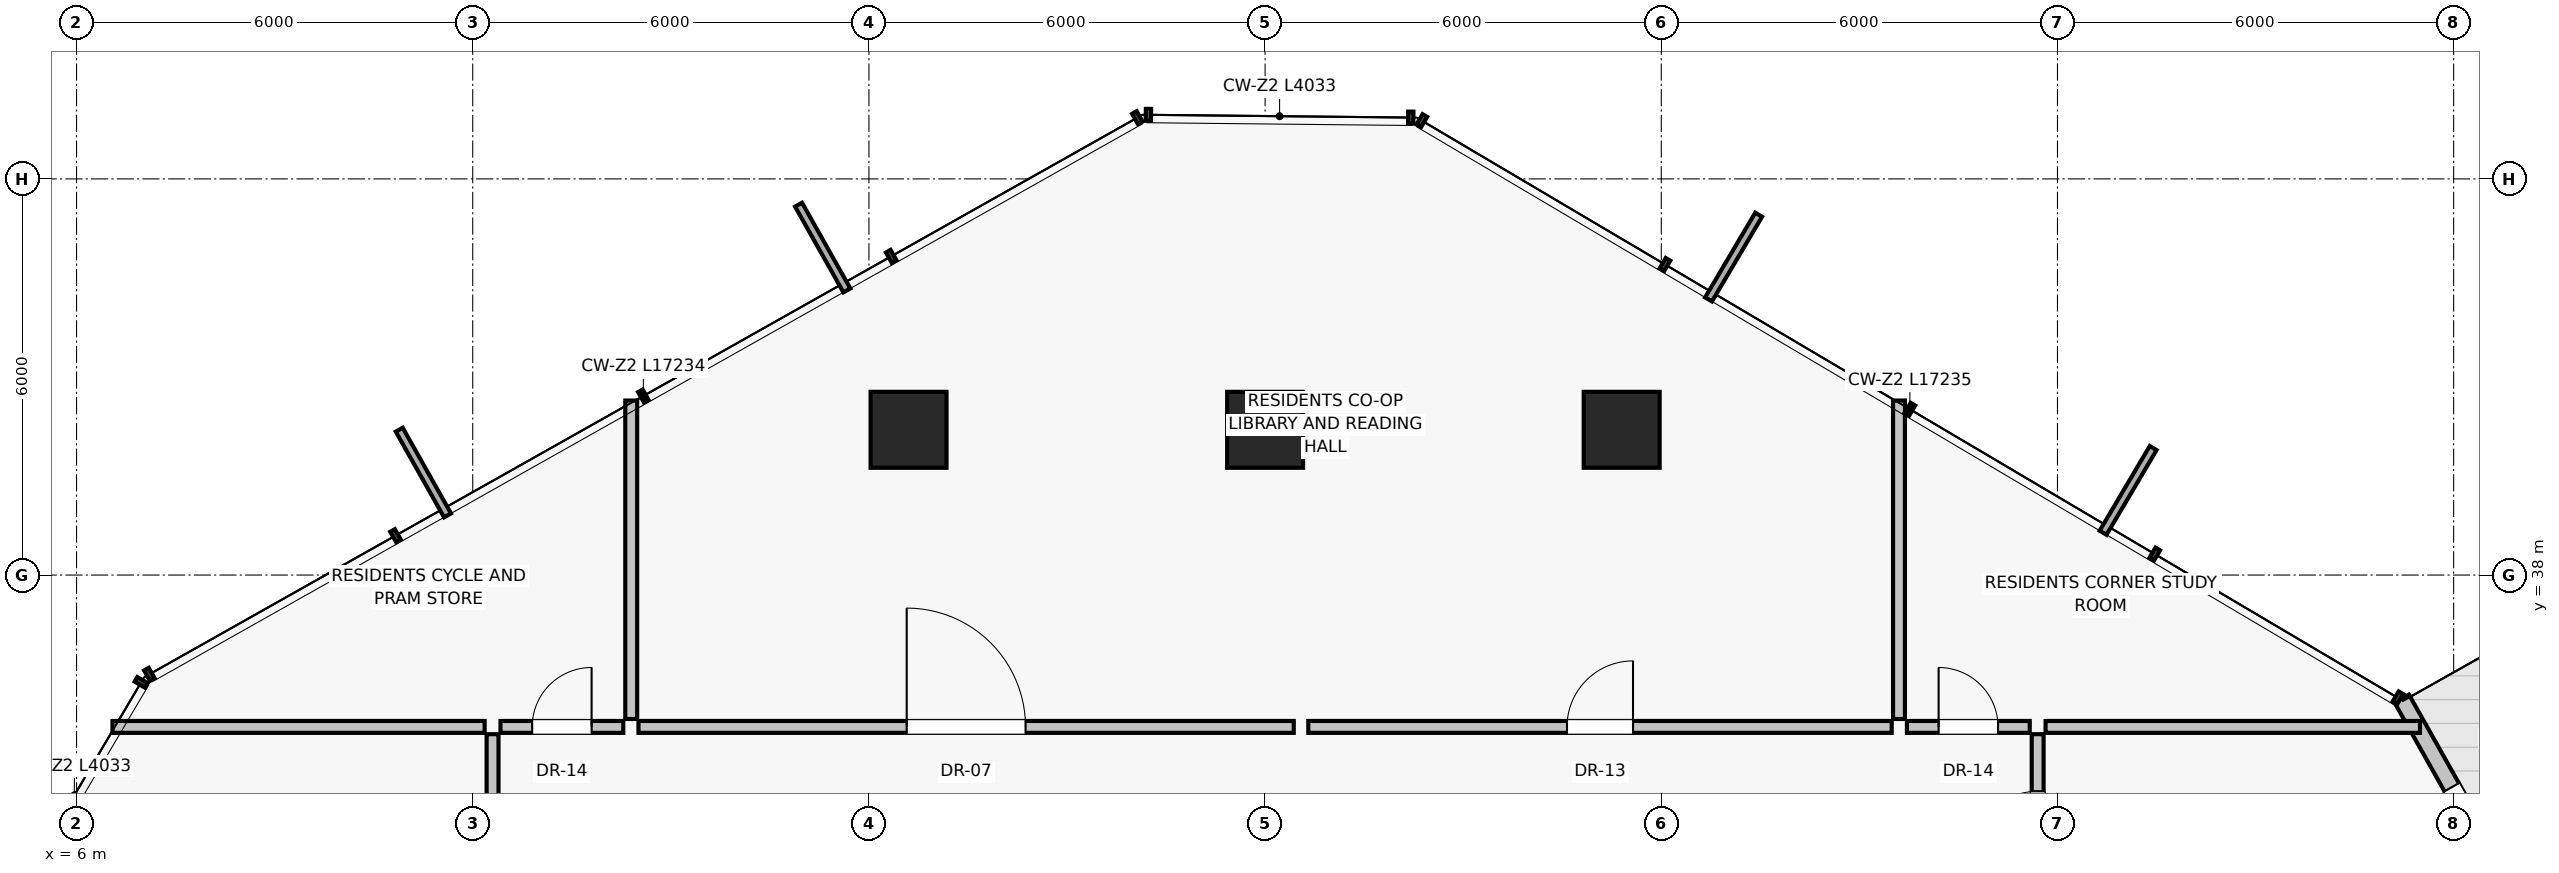
"""IFC4 building model, lengths in metres.
Left out: names, types, materials, properties, quantities, classifications, styles, units other than length and angle.
Written with IfcOpenShell. Run it as: python <this file> out.ifc"""

import sys

from ifc_helpers import new_model, si_unit, direction, frame, frame_2d, origin, origin_2d, place, context, subcontext, project, spatial, rectangle, extrude, source, transform, mapped, element, fill, save


model = new_model("IFC4")
c1 = context("Model", 3, precision=1e-05, world=origin(), true_north=direction((0.0, 1.0)))
c2 = subcontext(c1, "Body", "Model", "MODEL_VIEW")
j1 = project(units=[si_unit("LENGTHUNIT", "METRE"), si_unit("PLANEANGLEUNIT", "RADIAN")], contexts=[c1])
p1 = place(None, origin())
s1 = spatial("IfcSite", under=j1, at=p1, CompositionType="ELEMENT")
p2 = place(p1, origin())
s2 = spatial("IfcBuilding", under=s1, at=p2, CompositionType="ELEMENT")
p3 = place(p2, frame((0.0, 0.0, 126.25)))
s3 = spatial("IfcBuildingStorey", under=s2, at=p3, CompositionType="ELEMENT", Elevation=126.25)
for number, where, z_axis, x_axis in (
    (1, (29.4, 40.2, 0.0), (0.0, 0.0, 1.0), (1.0, 0.0, 0.0)),
    (2, (24.0, 40.2, 0.0), (0.0, 0.0, 1.0), (1.0, 0.0, 0.0)),
    (3, (18.6, 40.2, 0.0), (0.0, 0.0, 1.0), (1.0, 0.0, 0.0)),
):
    element("IfcColumn", number, at=place(p3, frame(where, z_axis=z_axis, x_axis=x_axis)), inside=s3, PredefinedType="COLUMN", context=c2, shape_type="SweptSolid", body=[
        extrude(rectangle(XDim=1.15, YDim=1.15, at=origin_2d()), origin(), (0.0, 0.0, 1.0), 3.25),
    ])
p4 = place(p3, frame((43.292, 32.441, 0.0), z_axis=(0.0, 0.0, 1.0), x_axis=(-0.490912790658, 0.871208718947, 0.0)))
e4 = element("IfcWall", 4, at=p4, inside=s3, PredefinedType="SOLIDWALL", context=c2, shape_type="SweptSolid", body=[
    extrude(rectangle(XDim=4.233, YDim=0.25, at=frame_2d((2.117, 0.0))), origin(), (0.0, 0.0, 1.0), 3.0),
])
p5 = place(p4, frame((1.542, 0.0, 0.0)))
e5 = element("IfcOpeningElement", 5, at=p5, cuts=e4, PredefinedType="OPENING", context=c2, shape_type="SweptSolid", body=[
    extrude(rectangle(XDim=1.15, YDim=2.25, at=frame_2d((0.575, 1.125))), frame((0.0, 0.135, 0.0), z_axis=(0.0, -1.0, 0.0), x_axis=(1.0, 0.0, 0.0)), (0.0, 0.0, 1.0), 0.27),
])
for number, where, z_axis, x_axis in (
    (6, (14.4, 35.82, 0.0), (0.0, 0.0, 1.0), (0.0, 1.0, 0.0)),
    (7, (33.6, 35.82, 0.0), (0.0, 0.0, 1.0), (0.0, 1.0, 0.0)),
):
    element("IfcWall", number, at=place(p3, frame(where, z_axis=z_axis, x_axis=x_axis)), inside=s3, PredefinedType="PARTITIONING", context=c2, shape_type="SweptSolid", body=[
        extrude(rectangle(XDim=4.823, YDim=0.18, at=frame_2d((2.412, 0.0))), origin(), (0.0, 0.0, 1.0), 3.0),
    ])
p6 = place(p3, frame((14.51, 35.7, 0.0), z_axis=(0.0, 0.0, 1.0), x_axis=(1.0, 0.0, 0.0)))
e8 = element("IfcWall", 8, at=p6, inside=s3, PredefinedType="PARTITIONING", context=c2, shape_type="SweptSolid", body=[
    extrude(rectangle(XDim=9.924, YDim=0.18, at=frame_2d((4.962, 0.0))), origin(), (0.0, 0.0, 1.0), 2.58),
])
p7 = place(p6, frame((4.062, 0.0, 0.0)))
e9 = element("IfcOpeningElement", 9, at=p7, cuts=e8, PredefinedType="OPENING", context=c2, shape_type="SweptSolid", body=[
    extrude(rectangle(XDim=1.8, YDim=2.25, at=frame_2d((0.9, 1.125))), frame((0.0, 0.1, 0.0), z_axis=(0.0, -1.0, 0.0), x_axis=(1.0, 0.0, 0.0)), (0.0, 0.0, 1.0), 0.2),
])
p8 = place(p3, frame((24.654, 35.7, 0.0), z_axis=(0.0, 0.0, 1.0), x_axis=(1.0, 0.0, 0.0)))
e10 = element("IfcWall", 10, at=p8, inside=s3, PredefinedType="PARTITIONING", context=c2, shape_type="SweptSolid", body=[
    extrude(rectangle(XDim=8.836, YDim=0.18, at=frame_2d((4.418, 0.0))), origin(), (0.0, 0.0, 1.0), 2.58),
])
p9 = place(p8, frame((3.918, 0.0, 0.0)))
e11 = element("IfcOpeningElement", 11, at=p9, cuts=e10, PredefinedType="OPENING", context=c2, shape_type="SweptSolid", body=[
    extrude(rectangle(XDim=1.0, YDim=2.01, at=frame_2d((0.5, 1.005))), frame((0.0, 0.1, 0.0), z_axis=(0.0, -1.0, 0.0), x_axis=(1.0, 0.0, 0.0)), (0.0, 0.0, 1.0), 0.2),
])
p10 = place(p3, frame((12.18, 35.7, 0.0), z_axis=(0.0, 0.0, 1.0), x_axis=(-1.0, 0.0, 0.0)))
e12 = element("IfcWall", 12, at=p10, inside=s3, PredefinedType="PARTITIONING", context=c2, shape_type="SweptSolid", body=[
    extrude(rectangle(XDim=5.636, YDim=0.18, at=frame_2d((2.818, 0.0))), origin(), (0.0, 0.0, 1.0), 3.0),
])
p11 = place(p3, frame((12.3, 24.11, 0.0), z_axis=(0.0, 0.0, 1.0), x_axis=(0.0, 1.0, 0.0)))
e13 = element("IfcWall", 13, at=p11, inside=s3, PredefinedType="PARTITIONING", context=c2, shape_type="SweptSolid", body=[
    extrude(rectangle(XDim=11.48, YDim=0.18, at=frame_2d((5.74, 0.0))), origin(), (0.0, 0.0, 1.0), 2.58),
])
p12 = place(p11, frame((5.24, 0.0, 0.0)))
e14 = element("IfcOpeningElement", 14, at=p12, cuts=e13, PredefinedType="OPENING", context=c2, shape_type="SweptSolid", body=[
    extrude(rectangle(XDim=1.0, YDim=2.01, at=frame_2d((0.5, 1.005))), frame((0.0, 0.1, 0.0), z_axis=(0.0, -1.0, 0.0), x_axis=(1.0, 0.0, 0.0)), (0.0, 0.0, 1.0), 0.2),
])
p13 = place(p3, frame((35.82, 35.7, 0.0), z_axis=(0.0, 0.0, 1.0), x_axis=(1.0, 0.0, 0.0)))
e15 = element("IfcWall", 15, at=p13, inside=s3, PredefinedType="PARTITIONING", context=c2, shape_type="SweptSolid", body=[
    extrude(rectangle(XDim=5.67, YDim=0.18, at=frame_2d((2.835, 0.0))), origin(), (0.0, 0.0, 1.0), 3.0),
])
p14 = place(p3, frame((35.7, 32.86, 0.0), z_axis=(0.0, 0.0, 1.0), x_axis=(0.0, 1.0, 0.0)))
e16 = element("IfcWall", 16, at=p14, inside=s3, PredefinedType="PARTITIONING", context=c2, shape_type="SweptSolid", body=[
    extrude(rectangle(XDim=2.73, YDim=0.18, at=frame_2d((1.365, 0.0))), origin(), (0.0, 0.0, 1.0), 3.0),
])
p15 = place(p14, frame((0.865, 0.0, 0.0)))
e17 = element("IfcOpeningElement", 17, at=p15, cuts=e16, PredefinedType="OPENING", context=c2, shape_type="SweptSolid", body=[
    extrude(rectangle(XDim=1.0, YDim=2.01, at=frame_2d((0.5, 1.005))), frame((0.0, 0.1, 0.0), z_axis=(0.0, -1.0, 0.0), x_axis=(1.0, 0.0, 0.0)), (0.0, 0.0, 1.0), 0.2),
])
p16 = place(p3, frame((12.42, 35.7, 0.0), z_axis=(0.0, 0.0, 1.0), x_axis=(1.0, 0.0, 0.0)))
e18 = element("IfcWall", 18, at=p16, inside=s3, PredefinedType="PARTITIONING", context=c2, shape_type="SweptSolid", body=[
    extrude(rectangle(XDim=1.86, YDim=0.18, at=frame_2d((0.93, 0.0))), origin(), (0.0, 0.0, 1.0), 3.0),
])
p17 = place(p16, frame((0.48, 0.0, 0.0)))
e19 = element("IfcOpeningElement", 19, at=p17, cuts=e18, PredefinedType="OPENING", context=c2, shape_type="SweptSolid", body=[
    extrude(rectangle(XDim=0.9, YDim=2.01, at=frame_2d((0.45, 1.005))), frame((0.0, 0.1, 0.0), z_axis=(0.0, -1.0, 0.0), x_axis=(1.0, 0.0, 0.0)), (0.0, 0.0, 1.0), 0.2),
])
p18 = place(p3, frame((33.72, 35.7, 0.0), z_axis=(0.0, 0.0, 1.0), x_axis=(1.0, 0.0, 0.0)))
e20 = element("IfcWall", 20, at=p18, inside=s3, PredefinedType="PARTITIONING", context=c2, shape_type="SweptSolid", body=[
    extrude(rectangle(XDim=1.86, YDim=0.18, at=frame_2d((0.93, 0.0))), origin(), (0.0, 0.0, 1.0), 3.0),
])
p19 = place(p18, frame((0.48, 0.0, 0.0)))
e21 = element("IfcOpeningElement", 21, at=p19, cuts=e20, PredefinedType="OPENING", context=c2, shape_type="SweptSolid", body=[
    extrude(rectangle(XDim=0.9, YDim=2.01, at=frame_2d((0.45, 1.005))), frame((0.0, 0.1, 0.0), z_axis=(0.0, -1.0, 0.0), x_axis=(1.0, 0.0, 0.0)), (0.0, 0.0, 1.0), 0.2),
])
m1 = source(origin(), c2, "Body", "SweptSolid", [
    extrude(rectangle(XDim=1.15, YDim=2.25, at=frame_2d((0.575, 1.125))), frame((0.0, 0.025, 0.0), z_axis=(0.0, -1.0, 0.0), x_axis=(1.0, 0.0, 0.0)), (0.0, 0.0, 1.0), 0.05),
])
p20 = place(p5, frame((1.15, 0.0, 0.0), z_axis=(0.0, 0.0, 1.0), x_axis=(-1.0, 0.0, 0.0)))
e22 = element("IfcDoor", 22, at=p20, inside=s3, OperationType="SINGLE_SWING_LEFT", PredefinedType="DOOR", context=c2, shape_type="MappedRepresentation", body=[
    mapped(m1, transform((0.0, 0.0, 0.0), scale=1.0)),
])
fill(e5, e22)
m2 = source(origin(), c2, "Body", "SweptSolid", [
    extrude(rectangle(XDim=1.8, YDim=2.25, at=frame_2d((0.9, 1.125))), frame((0.0, 0.025, 0.0), z_axis=(0.0, -1.0, 0.0), x_axis=(1.0, 0.0, 0.0)), (0.0, 0.0, 1.0), 0.05),
])
p21 = place(p7, origin())
e23 = element("IfcDoor", 23, at=p21, inside=s3, OperationType="SINGLE_SWING_LEFT", PredefinedType="DOOR", context=c2, shape_type="MappedRepresentation", body=[
    mapped(m2, transform((0.0, 0.0, 0.0), scale=1.0)),
])
fill(e9, e23)
m3 = source(origin(), c2, "Body", "SweptSolid", [
    extrude(rectangle(XDim=1.0, YDim=2.01, at=frame_2d((0.5, 1.005))), frame((0.0, 0.025, 0.0), z_axis=(0.0, -1.0, 0.0), x_axis=(1.0, 0.0, 0.0)), (0.0, 0.0, 1.0), 0.05),
])
p22 = place(p9, origin())
e24 = element("IfcDoor", 24, at=p22, inside=s3, OperationType="SINGLE_SWING_RIGHT", PredefinedType="DOOR", context=c2, shape_type="MappedRepresentation", body=[
    mapped(m3, transform((0.0, 0.0, 0.0), scale=1.0)),
])
fill(e11, e24)
p23 = place(p15, origin())
e25 = element("IfcDoor", 25, at=p23, inside=s3, OperationType="SINGLE_SWING_LEFT", PredefinedType="DOOR", context=c2, shape_type="MappedRepresentation", body=[
    mapped(m3, transform((0.0, 0.0, 0.0), scale=1.0)),
])
fill(e17, e25)
m4 = source(origin(), c2, "Body", "SweptSolid", [
    extrude(rectangle(XDim=0.9, YDim=2.01, at=frame_2d((0.45, 1.005))), frame((0.0, 0.025, 0.0), z_axis=(0.0, -1.0, 0.0), x_axis=(1.0, 0.0, 0.0)), (0.0, 0.0, 1.0), 0.05),
])
p24 = place(p17, origin())
e26 = element("IfcDoor", 26, at=p24, inside=s3, OperationType="SINGLE_SWING_RIGHT", PredefinedType="DOOR", context=c2, shape_type="MappedRepresentation", body=[
    mapped(m4, transform((0.0, 0.0, 0.0), scale=1.0)),
])
fill(e19, e26)
p25 = place(p19, origin())
e27 = element("IfcDoor", 27, at=p25, inside=s3, OperationType="SINGLE_SWING_LEFT", PredefinedType="DOOR", context=c2, shape_type="MappedRepresentation", body=[
    mapped(m4, transform((0.0, 0.0, 0.0), scale=1.0)),
])
fill(e21, e27)
save(model, sys.argv[1])
